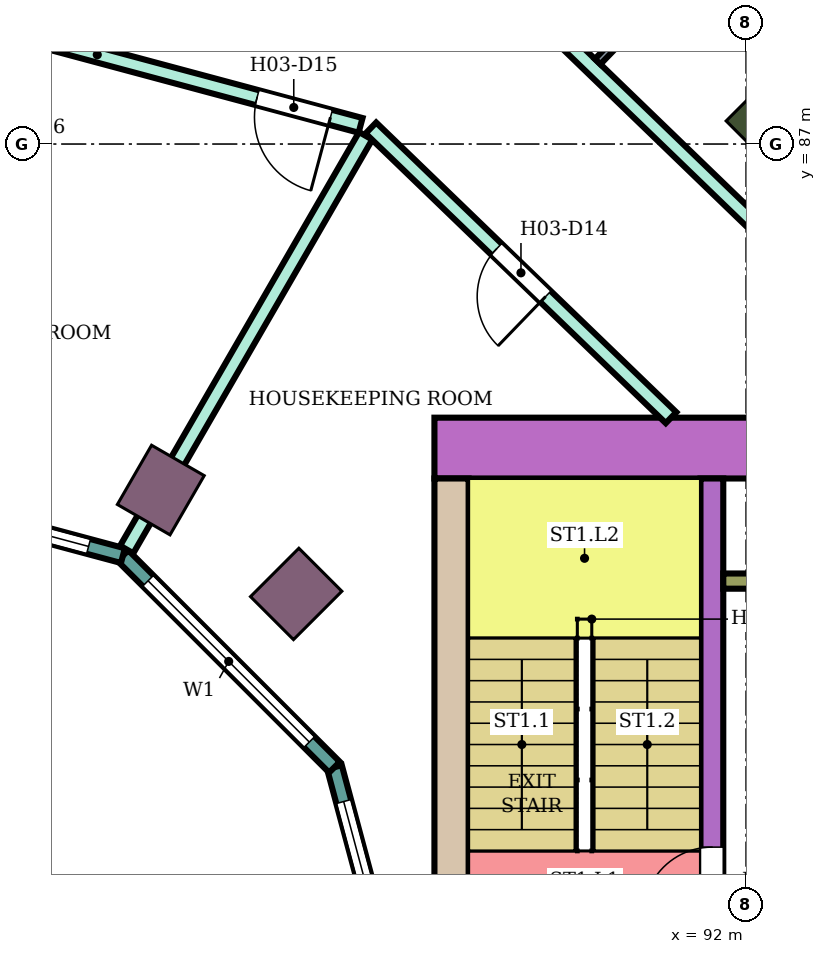
"""IFC4 building model, lengths in metres.
Left out: names, types, materials, properties, quantities, classifications, styles, units other than length and angle.
Written with IfcOpenShell. Run it as: python <this file> out.ifc"""

import sys

from ifc_helpers import new_model, si_unit, direction, frame, frame_2d, origin, origin_2d, place, context, subcontext, project, spatial, rectangle, extrude, element, fill, save


model = new_model("IFC4")
c1 = context("Model", 3, precision=1e-05, world=origin(), true_north=direction((0.0, 1.0)))
c2 = subcontext(c1, "Body", "Model", "MODEL_VIEW")
j1 = project(units=[si_unit("LENGTHUNIT", "METRE"), si_unit("PLANEANGLEUNIT", "RADIAN")], contexts=[c1])
p1 = place(None, origin())
s1 = spatial("IfcSite", under=j1, at=p1, CompositionType="ELEMENT")
p2 = place(p1, origin())
s2 = spatial("IfcBuilding", under=s1, at=p2, CompositionType="ELEMENT")
p3 = place(p2, frame((0.0, 0.0, 59.2)))
s3 = spatial("IfcBuildingStorey", under=s2, at=p3, CompositionType="ELEMENT", Elevation=59.2)
p4 = place(p3, frame((92.445, 87.445, 0.0), z_axis=(0.0, 0.0, 1.0), x_axis=(0.707106781187, 0.707106781187, 0.0)))
e1 = element("IfcColumn", 1, at=p4, inside=s3, PredefinedType="COLUMN", context=c2, shape_type="SweptSolid", body=[
    extrude(rectangle(XDim=1.2, YDim=0.8, at=origin_2d()), origin(), (0.0, 0.0, 1.0), 3.8),
])
for number, where, z_axis, x_axis in (
    (2, (86.081, 81.081, 0.0), (0.0, 0.0, 1.0), (0.707, 0.707, 0.0)),
    (3, (84.3, 82.448, 0.0), (0.0, 0.0, 1.0), (0.5, 0.866, 0.0)),
):
    element("IfcColumn", number, at=place(p3, frame(where, z_axis=z_axis, x_axis=x_axis)), inside=s3, PredefinedType="COLUMN", context=c2, shape_type="SweptSolid", body=[
        extrude(rectangle(XDim=0.9, YDim=0.8, at=origin_2d()), origin(), (0.0, 0.0, 1.0), 3.8),
    ])
p5 = place(p3, frame((87.9, 83.0, 0.0), z_axis=(0.0, 0.0, 1.0), x_axis=(1.0, 0.0, 0.0)))
e4 = element("IfcWall", 4, at=p5, inside=s3, PredefinedType="SHEAR", context=c2, shape_type="SweptSolid", body=[
    extrude(rectangle(XDim=14.7, YDim=0.8, at=frame_2d((7.35, 0.0))), origin(), (0.0, 0.0, 1.0), 3.48),
])
p6 = place(p5, frame((4.2, 0.0, 0.0)))
e5 = element("IfcOpeningElement", 5, at=p6, cuts=e4, PredefinedType="OPENING", context=c2, shape_type="SweptSolid", body=[
    extrude(rectangle(XDim=2.4, YDim=2.4, at=frame_2d((1.2, 1.2))), frame((0.0, 0.41, 0.0), z_axis=(0.0, -1.0, 0.0), x_axis=(1.0, 0.0, 0.0)), (0.0, 0.0, 1.0), 0.82),
])
p7 = place(p3, frame((88.125, 75.0, 0.0), z_axis=(0.0, 0.0, 1.0), x_axis=(0.0, 1.0, 0.0)))
e6 = element("IfcWall", 6, at=p7, inside=s3, PredefinedType="SHEAR", context=c2, shape_type="SweptSolid", body=[
    extrude(rectangle(XDim=7.6, YDim=0.45, at=frame_2d((3.8, 0.0))), origin(), (0.0, 0.0, 1.0), 3.48),
])
p8 = place(p3, frame((91.55, 75.0, 0.0), z_axis=(0.0, 0.0, 1.0), x_axis=(0.0, 1.0, 0.0)))
e7 = element("IfcWall", 7, at=p8, inside=s3, PredefinedType="SHEAR", context=c2, shape_type="SweptSolid", body=[
    extrude(rectangle(XDim=7.6, YDim=0.3, at=frame_2d((3.8, 0.0))), origin(), (0.0, 0.0, 1.0), 3.48),
])
p9 = place(p8, frame((1.85, 0.0, 0.0)))
e8 = element("IfcOpeningElement", 8, at=p9, cuts=e7, PredefinedType="OPENING", context=c2, shape_type="SweptSolid", body=[
    extrude(rectangle(XDim=0.9, YDim=2.1, at=frame_2d((0.45, 1.05))), frame((0.0, 0.16, 0.0), z_axis=(0.0, -1.0, 0.0), x_axis=(1.0, 0.0, 0.0)), (0.0, 0.0, 1.0), 0.32),
])
p10 = place(p3, frame((91.7, 81.25, 0.0), z_axis=(0.0, 0.0, 1.0), x_axis=(1.0, 0.0, 0.0)))
e9 = element("IfcWall", 9, at=p10, inside=s3, PredefinedType="SHEAR", context=c2, shape_type="SweptSolid", body=[
    extrude(rectangle(XDim=4.65, YDim=0.2, at=frame_2d((2.325, 0.0))), origin(), (0.0, 0.0, 1.0), 3.48),
])
p11 = place(p3, frame((87.604, 75.0, 0.0), z_axis=(0.0, 0.0, 1.0), x_axis=(-0.258789828301, 0.965933654434, 0.0)))
e10 = element("IfcWall", 10, at=p11, inside=s3, PredefinedType="NOTDEFINED", context=c2, shape_type="SweptSolid", body=[
    extrude(rectangle(XDim=3.936, YDim=0.2, at=frame_2d((1.968, 0.0))), origin(), (0.0, 0.0, 1.0), 3.8),
])
p12 = place(p11, frame((0.468, 0.0, 0.9)))
e11 = element("IfcOpeningElement", 11, at=p12, cuts=e10, PredefinedType="OPENING", context=c2, shape_type="SweptSolid", body=[
    extrude(rectangle(XDim=3.0, YDim=2.3, at=frame_2d((1.5, 1.15))), frame((0.0, 0.11, 0.0), z_axis=(0.0, -1.0, 0.0), x_axis=(1.0, 0.0, 0.0)), (0.0, 0.0, 1.0), 0.22),
])
p13 = place(p3, frame((86.585, 78.802, 0.0), z_axis=(0.0, 0.0, 1.0), x_axis=(-0.707106781187, 0.707106781187, 0.0)))
e12 = element("IfcWall", 12, at=p13, inside=s3, PredefinedType="NOTDEFINED", context=c2, shape_type="SweptSolid", body=[
    extrude(rectangle(XDim=3.936, YDim=0.2, at=frame_2d((1.968, 0.0))), origin(), (0.0, 0.0, 1.0), 3.8),
])
p14 = place(p13, frame((0.468, 0.0, 0.9)))
e13 = element("IfcOpeningElement", 13, at=p14, cuts=e12, PredefinedType="OPENING", context=c2, shape_type="SweptSolid", body=[
    extrude(rectangle(XDim=3.0, YDim=2.3, at=frame_2d((1.5, 1.15))), frame((0.0, 0.11, 0.0), z_axis=(0.0, -1.0, 0.0), x_axis=(1.0, 0.0, 0.0)), (0.0, 0.0, 1.0), 0.22),
])
p15 = place(p3, frame((83.802, 81.585, 0.0), z_axis=(0.0, 0.0, 1.0), x_axis=(-0.965933654434, 0.258789828301, 0.0)))
e14 = element("IfcWall", 14, at=p15, inside=s3, PredefinedType="NOTDEFINED", context=c2, shape_type="SweptSolid", body=[
    extrude(rectangle(XDim=3.936, YDim=0.2, at=frame_2d((1.968, 0.0))), origin(), (0.0, 0.0, 1.0), 3.8),
])
p16 = place(p15, frame((0.468, 0.0, 0.9)))
e15 = element("IfcOpeningElement", 15, at=p16, cuts=e14, PredefinedType="OPENING", context=c2, shape_type="SweptSolid", body=[
    extrude(rectangle(XDim=3.0, YDim=2.3, at=frame_2d((1.5, 1.15))), frame((0.0, 0.11, 0.0), z_axis=(0.0, -1.0, 0.0), x_axis=(1.0, 0.0, 0.0)), (0.0, 0.0, 1.0), 0.22),
])
p17 = place(p3, frame((80.0, 89.104, 0.0), z_axis=(0.0, 0.0, 1.0), x_axis=(0.965856548257, -0.259077455964, 0.0)))
e16 = element("IfcWall", 16, at=p17, inside=s3, PredefinedType="PARTITIONING", context=c2, shape_type="SweptSolid", body=[
    extrude(rectangle(XDim=7.173, YDim=0.2, at=frame_2d((3.586, 0.0))), origin(), (0.0, 0.0, 1.0), 3.35),
])
p18 = place(p17, frame((5.763, 0.0, 0.0)))
e17 = element("IfcOpeningElement", 17, at=p18, cuts=e16, PredefinedType="OPENING", context=c2, shape_type="SweptSolid", body=[
    extrude(rectangle(XDim=1.0, YDim=2.1, at=frame_2d((0.5, 1.05))), frame((0.0, 0.11, 0.0), z_axis=(0.0, -1.0, 0.0), x_axis=(1.0, 0.0, 0.0)), (0.0, 0.0, 1.0), 0.22),
])
p19 = place(p3, frame((83.851, 81.666, 0.0), z_axis=(0.0, 0.0, 1.0), x_axis=(0.500253653624, 0.865878907259, 0.0)))
e18 = element("IfcWall", 18, at=p19, inside=s3, PredefinedType="PARTITIONING", context=c2, shape_type="SweptSolid", body=[
    extrude(rectangle(XDim=6.285, YDim=0.2, at=frame_2d((3.143, 0.0))), origin(), (0.0, 0.0, 1.0), 3.35),
])
p20 = place(p3, frame((87.064, 87.211, 0.0), z_axis=(0.0, 0.0, 1.0), x_axis=(0.719562412484, -0.694427774891, 0.0)))
e19 = element("IfcWall", 19, at=p20, inside=s3, PredefinedType="PARTITIONING", context=c2, shape_type="SweptSolid", body=[
    extrude(rectangle(XDim=5.488, YDim=0.2, at=frame_2d((2.744, 0.0))), origin(), (0.0, 0.0, 1.0), 3.35),
])
p21 = place(p20, frame((2.294, 0.0, 0.0)))
e20 = element("IfcOpeningElement", 20, at=p21, cuts=e19, PredefinedType="OPENING", context=c2, shape_type="SweptSolid", body=[
    extrude(rectangle(XDim=0.9, YDim=2.1, at=frame_2d((0.45, 1.05))), frame((0.0, 0.11, 0.0), z_axis=(0.0, -1.0, 0.0), x_axis=(1.0, 0.0, 0.0)), (0.0, 0.0, 1.0), 0.22),
])
p22 = place(p3, frame((88.466, 89.473, 0.0), z_axis=(0.0, 0.0, 1.0), x_axis=(0.719346014649, -0.694651935295, 0.0)))
e21 = element("IfcWall", 21, at=p22, inside=s3, PredefinedType="PARTITIONING", context=c2, shape_type="SweptSolid", body=[
    extrude(rectangle(XDim=6.525, YDim=0.2, at=frame_2d((3.263, 0.0))), origin(), (0.0, 0.0, 1.0), 3.35),
])
p23 = place(p22, frame((5.034, 0.0, 0.0)))
e22 = element("IfcOpeningElement", 22, at=p23, cuts=e21, PredefinedType="OPENING", context=c2, shape_type="SweptSolid", body=[
    extrude(rectangle(XDim=1.0, YDim=2.1, at=frame_2d((0.5, 1.05))), frame((0.0, 0.11, 0.0), z_axis=(0.0, -1.0, 0.0), x_axis=(1.0, 0.0, 0.0)), (0.0, 0.0, 1.0), 0.22),
])
p24 = place(p3, frame((90.048, 88.085, 0.0), z_axis=(0.0, 0.0, 1.0), x_axis=(0.694655834207, 0.71934224956, 0.0)))
e23 = element("IfcWall", 23, at=p24, inside=s3, PredefinedType="PARTITIONING", context=c2, shape_type="SweptSolid", body=[
    extrude(rectangle(XDim=2.7, YDim=0.1, at=frame_2d((1.35, 0.0))), origin(), (0.0, 0.0, 1.0), 3.35),
])
p25 = place(p12, origin())
e24 = element("IfcWindow", 24, at=p25, inside=s3, PartitioningType="SINGLE_PANEL", PredefinedType="WINDOW", context=c2, shape_type="SweptSolid", body=[
    extrude(rectangle(XDim=3.0, YDim=2.3, at=frame_2d((1.5, 1.15))), frame((0.0, 0.03, 0.0), z_axis=(0.0, -1.0, 0.0), x_axis=(1.0, 0.0, 0.0)), (0.0, 0.0, 1.0), 0.06),
])
fill(e11, e24)
p26 = place(p14, origin())
e25 = element("IfcWindow", 25, at=p26, inside=s3, PartitioningType="SINGLE_PANEL", PredefinedType="WINDOW", context=c2, shape_type="SweptSolid", body=[
    extrude(rectangle(XDim=3.0, YDim=2.3, at=frame_2d((1.5, 1.15))), frame((0.0, 0.03, 0.0), z_axis=(0.0, -1.0, 0.0), x_axis=(1.0, 0.0, 0.0)), (0.0, 0.0, 1.0), 0.06),
])
fill(e13, e25)
p27 = place(p16, origin())
e26 = element("IfcWindow", 26, at=p27, inside=s3, PartitioningType="SINGLE_PANEL", PredefinedType="WINDOW", context=c2, shape_type="SweptSolid", body=[
    extrude(rectangle(XDim=3.0, YDim=2.3, at=frame_2d((1.5, 1.15))), frame((0.0, 0.03, 0.0), z_axis=(0.0, -1.0, 0.0), x_axis=(1.0, 0.0, 0.0)), (0.0, 0.0, 1.0), 0.06),
])
fill(e15, e26)
p28 = place(p21, frame((0.9, 0.0, 0.0), z_axis=(0.0, 0.0, 1.0), x_axis=(-1.0, 0.0, 0.0)))
e27 = element("IfcDoor", 27, at=p28, inside=s3, OperationType="SINGLE_SWING_LEFT", PredefinedType="DOOR", context=c2, shape_type="SweptSolid", body=[
    extrude(rectangle(XDim=0.9, YDim=2.1, at=frame_2d((0.45, 1.05))), frame((0.0, 0.025, 0.0), z_axis=(0.0, -1.0, 0.0), x_axis=(1.0, 0.0, 0.0)), (0.0, 0.0, 1.0), 0.05),
])
fill(e20, e27)
p29 = place(p18, frame((1.0, 0.0, 0.0), z_axis=(0.0, 0.0, 1.0), x_axis=(-1.0, 0.0, 0.0)))
e28 = element("IfcDoor", 28, at=p29, inside=s3, OperationType="SINGLE_SWING_LEFT", PredefinedType="DOOR", context=c2, shape_type="SweptSolid", body=[
    extrude(rectangle(XDim=1.0, YDim=2.1, at=frame_2d((0.5, 1.05))), frame((0.0, 0.025, 0.0), z_axis=(0.0, -1.0, 0.0), x_axis=(1.0, 0.0, 0.0)), (0.0, 0.0, 1.0), 0.05),
])
fill(e17, e28)
p30 = place(p9, origin())
e29 = element("IfcDoor", 29, at=p30, inside=s3, OperationType="SINGLE_SWING_LEFT", PredefinedType="DOOR", context=c2, shape_type="SweptSolid", body=[
    extrude(rectangle(XDim=0.9, YDim=2.1, at=frame_2d((0.45, 1.05))), frame((0.0, 0.025, 0.0), z_axis=(0.0, -1.0, 0.0), x_axis=(1.0, 0.0, 0.0)), (0.0, 0.0, 1.0), 0.05),
])
fill(e8, e29)
save(model, sys.argv[1])
